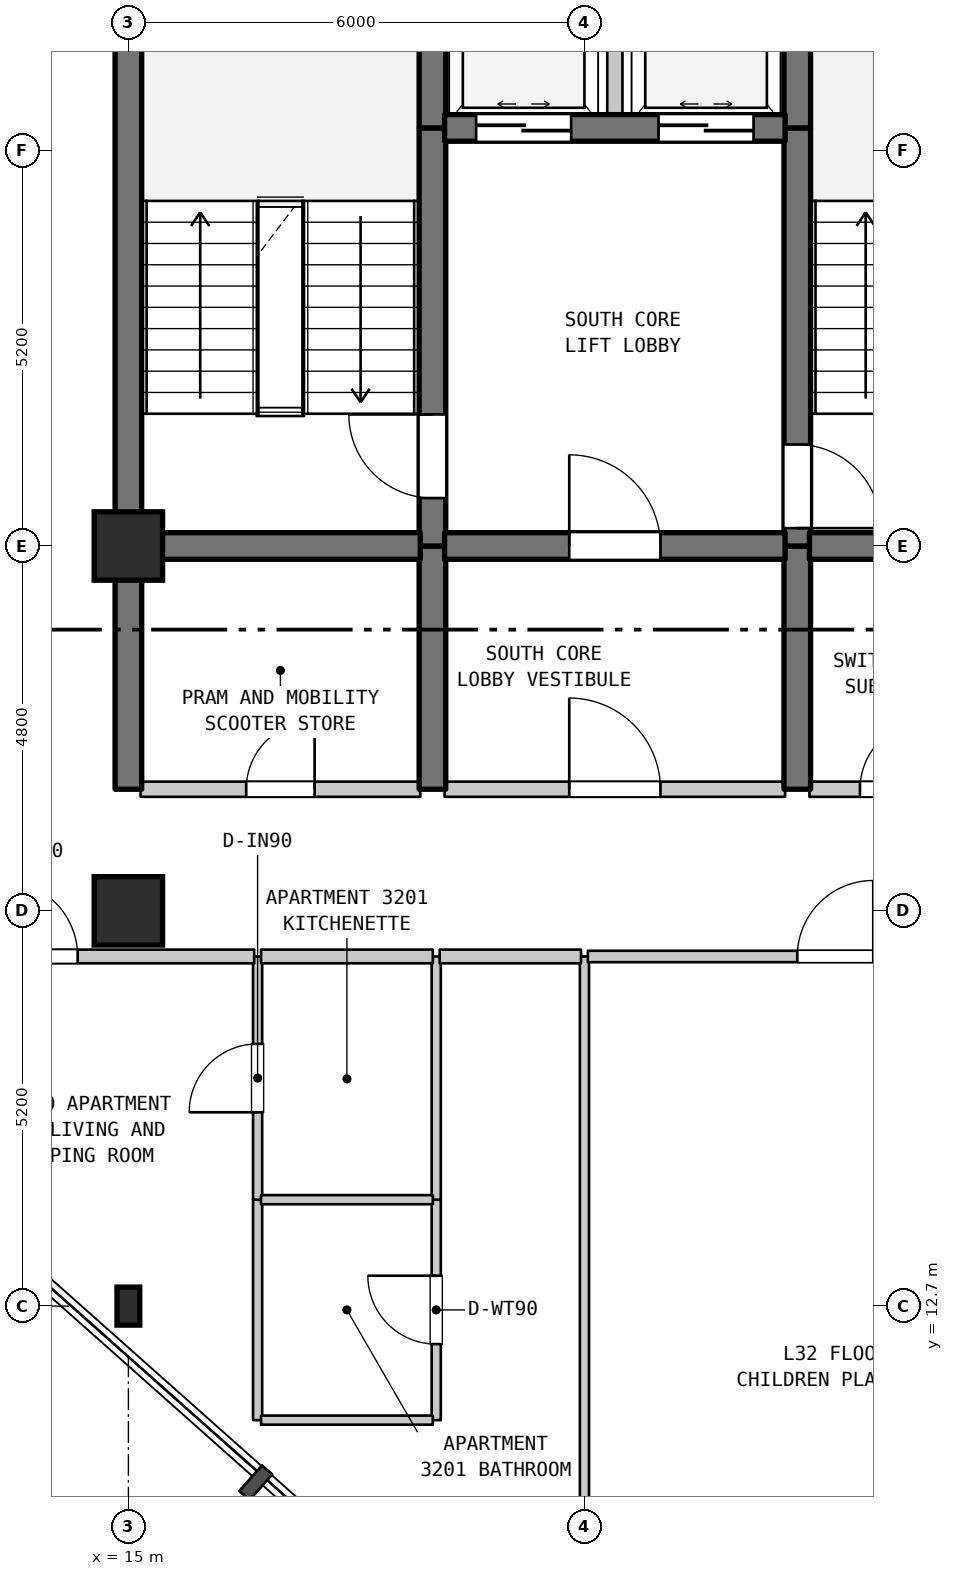
"""IFC4 building model, lengths in metres.
Left out: names, types, materials, properties, quantities, classifications, styles, units other than length and angle.
Written with IfcOpenShell. Run it as: python <this file> out.ifc"""

import sys

from ifc_helpers import new_model, si_unit, direction, frame, frame_2d, origin, origin_2d, place, context, subcontext, project, spatial, rectangle, i_section, extrude, element, fill, save


model = new_model("IFC4")
c1 = context("Model", 3, precision=1e-05, world=origin(), true_north=direction((0.0, 1.0)))
c2 = subcontext(c1, "Body", "Model", "MODEL_VIEW")
j1 = project(units=[si_unit("LENGTHUNIT", "METRE"), si_unit("PLANEANGLEUNIT", "RADIAN")], contexts=[c1])
p1 = place(None, origin())
s1 = spatial("IfcSite", under=j1, at=p1, CompositionType="ELEMENT")
p2 = place(p1, origin())
s2 = spatial("IfcBuilding", under=s1, at=p2, CompositionType="ELEMENT")
p3 = place(p2, frame((0.0, 0.0, 133.5)))
s3 = spatial("IfcBuildingStorey", under=s2, at=p3, CompositionType="ELEMENT", Elevation=133.5)
p4 = place(p3, frame((15.0, 12.7, 0.0), z_axis=(0.0, 0.0, 1.0), x_axis=(1.0, 0.0, 0.0)))
e1 = element("IfcColumn", 1, at=p4, inside=s3, PredefinedType="COLUMN", context=c2, shape_type="SweptSolid", body=[
    extrude(i_section(OverallWidth=0.3, OverallDepth=0.5, WebThickness=0.014, FlangeThickness=0.028, FilletRadius=0.027, at=origin_2d()), origin(), (0.0, 0.0, 1.0), 3.7),
])
for number, where, z_axis, x_axis in (
    (2, (15.0, 17.9, 0.0), (0.0, 0.0, 1.0), (1.0, 0.0, 0.0)),
    (3, (15.0, 22.7, 0.0), (0.0, 0.0, 1.0), (1.0, 0.0, 0.0)),
):
    element("IfcColumn", number, at=place(p3, frame(where, z_axis=z_axis, x_axis=x_axis)), inside=s3, PredefinedType="COLUMN", context=c2, shape_type="SweptSolid", body=[
        extrude(rectangle(XDim=0.9, YDim=0.9, at=origin_2d()), origin(), (0.0, 0.0, 1.0), 3.7),
    ])
p5 = place(p3, frame((15.0, 19.5, 0.0), z_axis=(0.0, 0.0, 1.0), x_axis=(0.0, 1.0, 0.0)))
e4 = element("IfcWall", 4, at=p5, inside=s3, PredefinedType="SHEAR", context=c2, shape_type="SweptSolid", body=[
    extrude(rectangle(XDim=3.2, YDim=0.35, at=frame_2d((1.6, 0.0))), origin(), (0.0, 0.0, 1.0), 3.385),
])
p6 = place(p3, frame((15.0, 22.7, 0.0), z_axis=(0.0, 0.0, 1.0), x_axis=(0.0, 1.0, 0.0)))
e5 = element("IfcWall", 5, at=p6, inside=s3, PredefinedType="SHEAR", context=c2, shape_type="SweptSolid", body=[
    extrude(rectangle(XDim=6.8, YDim=0.35, at=frame_2d((3.4, 0.0))), origin(), (0.0, 0.0, 1.0), 3.385),
])
p7 = place(p3, frame((16.7, 11.2, 0.0), z_axis=(0.0, 0.0, 1.0), x_axis=(0.0, 1.0, 0.0)))
e6 = element("IfcWall", 6, at=p7, inside=s3, PredefinedType="PARTITIONING", context=c2, shape_type="SweptSolid", body=[
    extrude(rectangle(XDim=2.9, YDim=0.12, at=frame_2d((1.45, 0.0))), origin(), (0.0, 0.0, 1.0), 3.385),
])
p8 = place(p3, frame((16.7, 14.1, 0.0), z_axis=(0.0, 0.0, 1.0), x_axis=(0.0, 1.0, 0.0)))
e7 = element("IfcWall", 7, at=p8, inside=s3, PredefinedType="PARTITIONING", context=c2, shape_type="SweptSolid", body=[
    extrude(rectangle(XDim=3.2, YDim=0.12, at=frame_2d((1.6, 0.0))), origin(), (0.0, 0.0, 1.0), 3.385),
])
p9 = place(p8, frame((1.15, 0.0, 0.0)))
e8 = element("IfcOpeningElement", 8, at=p9, cuts=e7, PredefinedType="OPENING", context=c2, shape_type="SweptSolid", body=[
    extrude(rectangle(XDim=0.9, YDim=2.15, at=frame_2d((0.45, 1.075))), frame((0.0, 0.07, 0.0), z_axis=(0.0, -1.0, 0.0), x_axis=(1.0, 0.0, 0.0)), (0.0, 0.0, 1.0), 0.14),
])
p10 = place(p3, frame((19.0, 19.5, 0.0), z_axis=(0.0, 0.0, 1.0), x_axis=(0.0, 1.0, 0.0)))
e9 = element("IfcWall", 9, at=p10, inside=s3, PredefinedType="SHEAR", context=c2, shape_type="SweptSolid", body=[
    extrude(rectangle(XDim=3.2, YDim=0.35, at=frame_2d((1.6, 0.0))), origin(), (0.0, 0.0, 1.0), 3.385),
])
p11 = place(p3, frame((19.0, 22.7, 0.0), z_axis=(0.0, 0.0, 1.0), x_axis=(0.0, 1.0, 0.0)))
e10 = element("IfcWall", 10, at=p11, inside=s3, PredefinedType="SHEAR", context=c2, shape_type="SweptSolid", body=[
    extrude(rectangle(XDim=5.5, YDim=0.35, at=frame_2d((2.75, 0.0))), origin(), (0.0, 0.0, 1.0), 3.385),
])
p12 = place(p11, frame((0.631, 0.0, 0.0)))
e11 = element("IfcOpeningElement", 11, at=p12, cuts=e10, PredefinedType="OPENING", context=c2, shape_type="SweptSolid", body=[
    extrude(rectangle(XDim=1.1, YDim=2.15, at=frame_2d((0.55, 1.075))), frame((0.0, 0.185, 0.0), z_axis=(0.0, -1.0, 0.0), x_axis=(1.0, 0.0, 0.0)), (0.0, 0.0, 1.0), 0.37),
])
p13 = place(p3, frame((19.0, 28.2, 0.0), z_axis=(0.0, 0.0, 1.0), x_axis=(0.0, 1.0, 0.0)))
e12 = element("IfcWall", 12, at=p13, inside=s3, PredefinedType="SHEAR", context=c2, shape_type="SweptSolid", body=[
    extrude(rectangle(XDim=1.3, YDim=0.35, at=frame_2d((0.65, 0.0))), origin(), (0.0, 0.0, 1.0), 3.385),
])
p14 = place(p3, frame((19.05, 11.2, 0.0), z_axis=(0.0, 0.0, 1.0), x_axis=(0.0, 1.0, 0.0)))
e13 = element("IfcWall", 13, at=p14, inside=s3, PredefinedType="PARTITIONING", context=c2, shape_type="SweptSolid", body=[
    extrude(rectangle(XDim=2.9, YDim=0.12, at=frame_2d((1.45, 0.0))), origin(), (0.0, 0.0, 1.0), 3.385),
])
p15 = place(p14, frame((1.0, 0.0, 0.0)))
e14 = element("IfcOpeningElement", 14, at=p15, cuts=e13, PredefinedType="OPENING", context=c2, shape_type="SweptSolid", body=[
    extrude(rectangle(XDim=0.9, YDim=2.1, at=frame_2d((0.45, 1.05))), frame((0.0, 0.07, 0.0), z_axis=(0.0, -1.0, 0.0), x_axis=(1.0, 0.0, 0.0)), (0.0, 0.0, 1.0), 0.14),
])
p16 = place(p3, frame((19.05, 14.1, 0.0), z_axis=(0.0, 0.0, 1.0), x_axis=(0.0, 1.0, 0.0)))
e15 = element("IfcWall", 15, at=p16, inside=s3, PredefinedType="PARTITIONING", context=c2, shape_type="SweptSolid", body=[
    extrude(rectangle(XDim=3.2, YDim=0.12, at=frame_2d((1.6, 0.0))), origin(), (0.0, 0.0, 1.0), 3.385),
])
p17 = place(p3, frame((21.0, 6.71, 0.0), z_axis=(0.0, 0.0, 1.0), x_axis=(0.0, 1.0, 0.0)))
e16 = element("IfcWall", 16, at=p17, inside=s3, PredefinedType="PARTITIONING", context=c2, shape_type="SweptSolid", body=[
    extrude(rectangle(XDim=10.59, YDim=0.12, at=frame_2d((5.295, 0.0))), origin(), (0.0, 0.0, 1.0), 3.385),
])
p18 = place(p3, frame((21.4, 28.2, 0.0), z_axis=(0.0, 0.0, 1.0), x_axis=(0.0, 1.0, 0.0)))
e17 = element("IfcWall", 17, at=p18, inside=s3, PredefinedType="STANDARD", context=c2, shape_type="SweptSolid", body=[
    extrude(rectangle(XDim=2.6, YDim=0.2, at=frame_2d((1.3, 0.0))), origin(), (0.0, 0.0, 1.0), 3.385),
])
p19 = place(p3, frame((23.8, 19.5, 0.0), z_axis=(0.0, 0.0, 1.0), x_axis=(0.0, 1.0, 0.0)))
e18 = element("IfcWall", 18, at=p19, inside=s3, PredefinedType="SHEAR", context=c2, shape_type="SweptSolid", body=[
    extrude(rectangle(XDim=3.2, YDim=0.35, at=frame_2d((1.6, 0.0))), origin(), (0.0, 0.0, 1.0), 3.385),
])
p20 = place(p3, frame((23.8, 22.7, 0.0), z_axis=(0.0, 0.0, 1.0), x_axis=(0.0, 1.0, 0.0)))
e19 = element("IfcWall", 19, at=p20, inside=s3, PredefinedType="SHEAR", context=c2, shape_type="SweptSolid", body=[
    extrude(rectangle(XDim=5.5, YDim=0.35, at=frame_2d((2.75, 0.0))), origin(), (0.0, 0.0, 1.0), 3.385),
])
p21 = place(p20, frame((0.235, 0.0, 0.0)))
e20 = element("IfcOpeningElement", 20, at=p21, cuts=e19, PredefinedType="OPENING", context=c2, shape_type="SweptSolid", body=[
    extrude(rectangle(XDim=1.1, YDim=2.15, at=frame_2d((0.55, 1.075))), frame((0.0, 0.185, 0.0), z_axis=(0.0, -1.0, 0.0), x_axis=(1.0, 0.0, 0.0)), (0.0, 0.0, 1.0), 0.37),
])
p22 = place(p3, frame((23.8, 28.2, 0.0), z_axis=(0.0, 0.0, 1.0), x_axis=(0.0, 1.0, 0.0)))
e21 = element("IfcWall", 21, at=p22, inside=s3, PredefinedType="SHEAR", context=c2, shape_type="SweptSolid", body=[
    extrude(rectangle(XDim=1.3, YDim=0.35, at=frame_2d((0.65, 0.0))), origin(), (0.0, 0.0, 1.0), 3.385),
])
for number, where, z_axis, x_axis in (
    (22, (16.745, 11.2, 0.0), (0.0, 0.0, 1.0), (1.0, 0.0, 0.0)),
    (23, (16.745, 14.1, 0.0), (0.0, 0.0, 1.0), (1.0, 0.0, 0.0)),
):
    element("IfcWall", number, at=place(p3, frame(where, z_axis=z_axis, x_axis=x_axis)), inside=s3, PredefinedType="PARTITIONING", context=c2, shape_type="SweptSolid", body=[
        extrude(rectangle(XDim=2.26, YDim=0.12, at=frame_2d((1.13, 0.0))), origin(), (0.0, 0.0, 1.0), 3.385),
    ])
p23 = place(p3, frame((12.875, 17.3, 0.0), z_axis=(0.0, 0.0, 1.0), x_axis=(1.0, 0.0, 0.0)))
e24 = element("IfcWall", 24, at=p23, inside=s3, PredefinedType="STANDARD", context=c2, shape_type="SweptSolid", body=[
    extrude(rectangle(XDim=3.78, YDim=0.18, at=frame_2d((1.89, 0.0))), origin(), (0.0, 0.0, 1.0), 3.385),
])
p24 = place(p23, frame((0.458, 0.0, 0.0)))
e25 = element("IfcOpeningElement", 25, at=p24, cuts=e24, PredefinedType="OPENING", context=c2, shape_type="SweptSolid", body=[
    extrude(rectangle(XDim=1.0, YDim=2.15, at=frame_2d((0.5, 1.075))), frame((0.0, 0.1, 0.0), z_axis=(0.0, -1.0, 0.0), x_axis=(1.0, 0.0, 0.0)), (0.0, 0.0, 1.0), 0.2),
])
p25 = place(p3, frame((16.745, 17.3, 0.0), z_axis=(0.0, 0.0, 1.0), x_axis=(1.0, 0.0, 0.0)))
e26 = element("IfcWall", 26, at=p25, inside=s3, PredefinedType="STANDARD", context=c2, shape_type="SweptSolid", body=[
    extrude(rectangle(XDim=2.26, YDim=0.18, at=frame_2d((1.13, 0.0))), origin(), (0.0, 0.0, 1.0), 3.385),
])
p26 = place(p3, frame((19.095, 17.3, 0.0), z_axis=(0.0, 0.0, 1.0), x_axis=(1.0, 0.0, 0.0)))
e27 = element("IfcWall", 27, at=p26, inside=s3, PredefinedType="STANDARD", context=c2, shape_type="SweptSolid", body=[
    extrude(rectangle(XDim=1.86, YDim=0.18, at=frame_2d((0.93, 0.0))), origin(), (0.0, 0.0, 1.0), 3.385),
])
p27 = place(p3, frame((21.045, 17.3, 0.0), z_axis=(0.0, 0.0, 1.0), x_axis=(1.0, 0.0, 0.0)))
e28 = element("IfcWall", 28, at=p27, inside=s3, PredefinedType="STANDARD", context=c2, shape_type="SweptSolid", body=[
    extrude(rectangle(XDim=6.51, YDim=0.15, at=frame_2d((3.255, 0.0))), origin(), (0.0, 0.0, 1.0), 3.385),
])
p28 = place(p27, frame((2.755, 0.0, 0.0)))
e29 = element("IfcOpeningElement", 29, at=p28, cuts=e28, PredefinedType="OPENING", context=c2, shape_type="SweptSolid", body=[
    extrude(rectangle(XDim=1.0, YDim=2.15, at=frame_2d((0.5, 1.075))), frame((0.0, 0.085, 0.0), z_axis=(0.0, -1.0, 0.0), x_axis=(1.0, 0.0, 0.0)), (0.0, 0.0, 1.0), 0.17),
])
p29 = place(p3, frame((15.16, 19.5, 0.0), z_axis=(0.0, 0.0, 1.0), x_axis=(1.0, 0.0, 0.0)))
e30 = element("IfcWall", 30, at=p29, inside=s3, PredefinedType="STANDARD", context=c2, shape_type="SweptSolid", body=[
    extrude(rectangle(XDim=3.68, YDim=0.2, at=frame_2d((1.84, 0.0))), origin(), (0.0, 0.0, 1.0), 3.385),
])
p30 = place(p29, frame((1.39, 0.0, 0.0)))
e31 = element("IfcOpeningElement", 31, at=p30, cuts=e30, PredefinedType="OPENING", context=c2, shape_type="SweptSolid", body=[
    extrude(rectangle(XDim=0.9, YDim=2.15, at=frame_2d((0.45, 1.075))), frame((0.0, 0.11, 0.0), z_axis=(0.0, -1.0, 0.0), x_axis=(1.0, 0.0, 0.0)), (0.0, 0.0, 1.0), 0.22),
])
p31 = place(p3, frame((19.16, 19.5, 0.0), z_axis=(0.0, 0.0, 1.0), x_axis=(1.0, 0.0, 0.0)))
e32 = element("IfcWall", 32, at=p31, inside=s3, PredefinedType="STANDARD", context=c2, shape_type="SweptSolid", body=[
    extrude(rectangle(XDim=4.48, YDim=0.2, at=frame_2d((2.24, 0.0))), origin(), (0.0, 0.0, 1.0), 3.385),
])
p32 = place(p31, frame((1.64, 0.0, 0.0)))
e33 = element("IfcOpeningElement", 33, at=p32, cuts=e32, PredefinedType="OPENING", context=c2, shape_type="SweptSolid", body=[
    extrude(rectangle(XDim=1.2, YDim=2.2, at=frame_2d((0.6, 1.1))), frame((0.0, 0.11, 0.0), z_axis=(0.0, -1.0, 0.0), x_axis=(1.0, 0.0, 0.0)), (0.0, 0.0, 1.0), 0.22),
])
p33 = place(p3, frame((23.96, 19.5, 0.0), z_axis=(0.0, 0.0, 1.0), x_axis=(1.0, 0.0, 0.0)))
e34 = element("IfcWall", 34, at=p33, inside=s3, PredefinedType="STANDARD", context=c2, shape_type="SweptSolid", body=[
    extrude(rectangle(XDim=4.455, YDim=0.2, at=frame_2d((2.228, 0.0))), origin(), (0.0, 0.0, 1.0), 3.385),
])
p34 = place(p33, frame((0.665, 0.0, 0.0)))
e35 = element("IfcOpeningElement", 35, at=p34, cuts=e34, PredefinedType="OPENING", context=c2, shape_type="SweptSolid", body=[
    extrude(rectangle(XDim=0.9, YDim=2.15, at=frame_2d((0.45, 1.075))), frame((0.0, 0.11, 0.0), z_axis=(0.0, -1.0, 0.0), x_axis=(1.0, 0.0, 0.0)), (0.0, 0.0, 1.0), 0.22),
])
p35 = place(p33, frame((2.791, 0.0, 0.0)))
e36 = element("IfcOpeningElement", 36, at=p35, cuts=e34, PredefinedType="OPENING", context=c2, shape_type="SweptSolid", body=[
    extrude(rectangle(XDim=0.9, YDim=2.15, at=frame_2d((0.45, 1.075))), frame((0.0, 0.11, 0.0), z_axis=(0.0, -1.0, 0.0), x_axis=(1.0, 0.0, 0.0)), (0.0, 0.0, 1.0), 0.22),
])
p36 = place(p3, frame((15.16, 22.7, 0.0), z_axis=(0.0, 0.0, 1.0), x_axis=(1.0, 0.0, 0.0)))
e37 = element("IfcWall", 37, at=p36, inside=s3, PredefinedType="SHEAR", context=c2, shape_type="SweptSolid", body=[
    extrude(rectangle(XDim=3.68, YDim=0.35, at=frame_2d((1.84, 0.0))), origin(), (0.0, 0.0, 1.0), 3.385),
])
p37 = place(p3, frame((19.16, 22.7, 0.0), z_axis=(0.0, 0.0, 1.0), x_axis=(1.0, 0.0, 0.0)))
e38 = element("IfcWall", 38, at=p37, inside=s3, PredefinedType="SHEAR", context=c2, shape_type="SweptSolid", body=[
    extrude(rectangle(XDim=4.48, YDim=0.35, at=frame_2d((2.24, 0.0))), origin(), (0.0, 0.0, 1.0), 3.385),
])
p38 = place(p37, frame((1.64, 0.0, 0.0)))
e39 = element("IfcOpeningElement", 39, at=p38, cuts=e38, PredefinedType="OPENING", context=c2, shape_type="SweptSolid", body=[
    extrude(rectangle(XDim=1.2, YDim=2.2, at=frame_2d((0.6, 1.1))), frame((0.0, 0.185, 0.0), z_axis=(0.0, -1.0, 0.0), x_axis=(1.0, 0.0, 0.0)), (0.0, 0.0, 1.0), 0.37),
])
p39 = place(p3, frame((23.96, 22.7, 0.0), z_axis=(0.0, 0.0, 1.0), x_axis=(1.0, 0.0, 0.0)))
e40 = element("IfcWall", 40, at=p39, inside=s3, PredefinedType="SHEAR", context=c2, shape_type="SweptSolid", body=[
    extrude(rectangle(XDim=3.18, YDim=0.35, at=frame_2d((1.59, 0.0))), origin(), (0.0, 0.0, 1.0), 3.385),
])
p40 = place(p3, frame((19.16, 28.2, 0.0), z_axis=(0.0, 0.0, 1.0), x_axis=(1.0, 0.0, 0.0)))
e41 = element("IfcWall", 41, at=p40, inside=s3, PredefinedType="SHEAR", context=c2, shape_type="SweptSolid", body=[
    extrude(rectangle(XDim=4.48, YDim=0.35, at=frame_2d((2.24, 0.0))), origin(), (0.0, 0.0, 1.0), 3.385),
])
p41 = place(p40, frame((0.415, 0.0, 0.0)))
e42 = element("IfcOpeningElement", 42, at=p41, cuts=e41, PredefinedType="OPENING", context=c2, shape_type="SweptSolid", body=[
    extrude(rectangle(XDim=1.25, YDim=2.2, at=frame_2d((0.625, 1.1))), frame((0.0, 0.185, 0.0), z_axis=(0.0, -1.0, 0.0), x_axis=(1.0, 0.0, 0.0)), (0.0, 0.0, 1.0), 0.37),
])
p42 = place(p40, frame((2.815, 0.0, 0.0)))
e43 = element("IfcOpeningElement", 43, at=p42, cuts=e41, PredefinedType="OPENING", context=c2, shape_type="SweptSolid", body=[
    extrude(rectangle(XDim=1.25, YDim=2.2, at=frame_2d((0.625, 1.1))), frame((0.0, 0.185, 0.0), z_axis=(0.0, -1.0, 0.0), x_axis=(1.0, 0.0, 0.0)), (0.0, 0.0, 1.0), 0.37),
])
p43 = place(p9, origin())
e44 = element("IfcDoor", 44, at=p43, inside=s3, OperationType="SINGLE_SWING_LEFT", PredefinedType="DOOR", context=c2, shape_type="SweptSolid", body=[
    extrude(rectangle(XDim=0.9, YDim=2.15, at=frame_2d((0.45, 1.075))), frame((0.0, 0.025, 0.0), z_axis=(0.0, -1.0, 0.0), x_axis=(1.0, 0.0, 0.0)), (0.0, 0.0, 1.0), 0.05),
])
fill(e8, e44)
p44 = place(p12, origin())
e45 = element("IfcDoor", 45, at=p44, inside=s3, OperationType="SINGLE_SWING_RIGHT", PredefinedType="DOOR", context=c2, shape_type="SweptSolid", body=[
    extrude(rectangle(XDim=1.1, YDim=2.15, at=frame_2d((0.55, 1.075))), frame((0.0, 0.025, 0.0), z_axis=(0.0, -1.0, 0.0), x_axis=(1.0, 0.0, 0.0)), (0.0, 0.0, 1.0), 0.05),
])
fill(e11, e45)
p45 = place(p15, origin())
e46 = element("IfcDoor", 46, at=p45, inside=s3, OperationType="SINGLE_SWING_RIGHT", PredefinedType="DOOR", context=c2, shape_type="SweptSolid", body=[
    extrude(rectangle(XDim=0.9, YDim=2.1, at=frame_2d((0.45, 1.05))), frame((0.0, 0.025, 0.0), z_axis=(0.0, -1.0, 0.0), x_axis=(1.0, 0.0, 0.0)), (0.0, 0.0, 1.0), 0.05),
])
fill(e14, e46)
p46 = place(p21, frame((1.1, 0.0, 0.0), z_axis=(0.0, 0.0, 1.0), x_axis=(-1.0, 0.0, 0.0)))
e47 = element("IfcDoor", 47, at=p46, inside=s3, OperationType="SINGLE_SWING_LEFT", PredefinedType="DOOR", context=c2, shape_type="SweptSolid", body=[
    extrude(rectangle(XDim=1.1, YDim=2.15, at=frame_2d((0.55, 1.075))), frame((0.0, 0.025, 0.0), z_axis=(0.0, -1.0, 0.0), x_axis=(1.0, 0.0, 0.0)), (0.0, 0.0, 1.0), 0.05),
])
fill(e20, e47)
p47 = place(p24, origin())
e48 = element("IfcDoor", 48, at=p47, inside=s3, OperationType="SINGLE_SWING_LEFT", PredefinedType="DOOR", context=c2, shape_type="SweptSolid", body=[
    extrude(rectangle(XDim=1.0, YDim=2.15, at=frame_2d((0.5, 1.075))), frame((0.0, 0.025, 0.0), z_axis=(0.0, -1.0, 0.0), x_axis=(1.0, 0.0, 0.0)), (0.0, 0.0, 1.0), 0.05),
])
fill(e25, e48)
p48 = place(p28, origin())
e49 = element("IfcDoor", 49, at=p48, inside=s3, OperationType="SINGLE_SWING_RIGHT", PredefinedType="DOOR", context=c2, shape_type="SweptSolid", body=[
    extrude(rectangle(XDim=1.0, YDim=2.15, at=frame_2d((0.5, 1.075))), frame((0.0, 0.025, 0.0), z_axis=(0.0, -1.0, 0.0), x_axis=(1.0, 0.0, 0.0)), (0.0, 0.0, 1.0), 0.05),
])
fill(e29, e49)
p49 = place(p30, origin())
e50 = element("IfcDoor", 50, at=p49, inside=s3, OperationType="SINGLE_SWING_RIGHT", PredefinedType="DOOR", context=c2, shape_type="SweptSolid", body=[
    extrude(rectangle(XDim=0.9, YDim=2.15, at=frame_2d((0.45, 1.075))), frame((0.0, 0.025, 0.0), z_axis=(0.0, -1.0, 0.0), x_axis=(1.0, 0.0, 0.0)), (0.0, 0.0, 1.0), 0.05),
])
fill(e31, e50)
p50 = place(p32, origin())
e51 = element("IfcDoor", 51, at=p50, inside=s3, OperationType="SINGLE_SWING_LEFT", PredefinedType="DOOR", context=c2, shape_type="SweptSolid", body=[
    extrude(rectangle(XDim=1.2, YDim=2.2, at=frame_2d((0.6, 1.1))), frame((0.0, 0.025, 0.0), z_axis=(0.0, -1.0, 0.0), x_axis=(1.0, 0.0, 0.0)), (0.0, 0.0, 1.0), 0.05),
])
fill(e33, e51)
p51 = place(p34, origin())
e52 = element("IfcDoor", 52, at=p51, inside=s3, OperationType="SINGLE_SWING_RIGHT", PredefinedType="DOOR", context=c2, shape_type="SweptSolid", body=[
    extrude(rectangle(XDim=0.9, YDim=2.15, at=frame_2d((0.45, 1.075))), frame((0.0, 0.025, 0.0), z_axis=(0.0, -1.0, 0.0), x_axis=(1.0, 0.0, 0.0)), (0.0, 0.0, 1.0), 0.05),
])
fill(e35, e52)
p52 = place(p38, origin())
e53 = element("IfcDoor", 53, at=p52, inside=s3, OperationType="SINGLE_SWING_LEFT", PredefinedType="DOOR", context=c2, shape_type="SweptSolid", body=[
    extrude(rectangle(XDim=1.2, YDim=2.2, at=frame_2d((0.6, 1.1))), frame((0.0, 0.025, 0.0), z_axis=(0.0, -1.0, 0.0), x_axis=(1.0, 0.0, 0.0)), (0.0, 0.0, 1.0), 0.05),
])
fill(e39, e53)
p53 = place(p41, origin())
e54 = element("IfcDoor", 54, at=p53, inside=s3, OperationType="DOUBLE_DOOR_SLIDING", PredefinedType="DOOR", context=c2, shape_type="SweptSolid", body=[
    extrude(rectangle(XDim=1.25, YDim=2.2, at=frame_2d((0.625, 1.1))), frame((0.0, 0.025, 0.0), z_axis=(0.0, -1.0, 0.0), x_axis=(1.0, 0.0, 0.0)), (0.0, 0.0, 1.0), 0.05),
])
fill(e42, e54)
p54 = place(p42, origin())
e55 = element("IfcDoor", 55, at=p54, inside=s3, OperationType="DOUBLE_DOOR_SLIDING", PredefinedType="DOOR", context=c2, shape_type="SweptSolid", body=[
    extrude(rectangle(XDim=1.25, YDim=2.2, at=frame_2d((0.625, 1.1))), frame((0.0, 0.025, 0.0), z_axis=(0.0, -1.0, 0.0), x_axis=(1.0, 0.0, 0.0)), (0.0, 0.0, 1.0), 0.05),
])
fill(e43, e55)
save(model, sys.argv[1])
